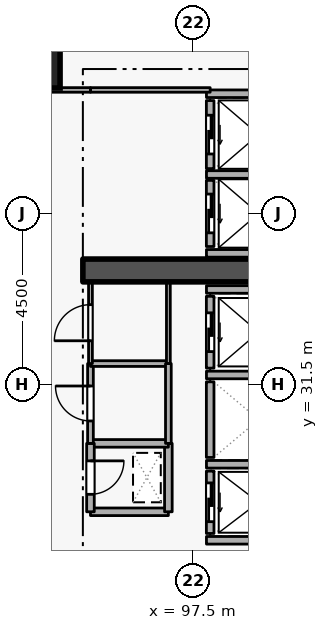
"""IFC4 building model, lengths in metres.
Left out: names, types, materials, properties, quantities, classifications, styles, units other than length and angle.
Written with IfcOpenShell. Run it as: python <this file> out.ifc"""

import sys

from ifc_helpers import new_model, si_unit, direction, frame, frame_2d, origin, origin_2d, place, context, subcontext, project, spatial, rectangle, extrude, element, fill, save


model = new_model("IFC4")
c1 = context("Model", 3, precision=1e-05, world=origin(), true_north=direction((0.0, 1.0)))
c2 = subcontext(c1, "Body", "Model", "MODEL_VIEW")
j1 = project(units=[si_unit("LENGTHUNIT", "METRE"), si_unit("PLANEANGLEUNIT", "RADIAN")], contexts=[c1])
p1 = place(None, origin())
s1 = spatial("IfcSite", under=j1, at=p1, CompositionType="ELEMENT")
p2 = place(p1, origin())
s2 = spatial("IfcBuilding", under=s1, at=p2, CompositionType="ELEMENT")
p3 = place(p2, frame((0.0, 0.0, 64.5)))
s3 = spatial("IfcBuildingStorey", under=s2, at=p3, CompositionType="ELEMENT", Elevation=64.5)
p4 = place(p3, frame((94.6, 34.5, 0.0), z_axis=(0.0, 0.0, 1.0), x_axis=(1.0, 0.0, 0.0)))
e1 = element("IfcWall", 1, at=p4, inside=s3, PredefinedType="SHEAR", context=c2, shape_type="SweptSolid", body=[
    extrude(rectangle(XDim=5.7, YDim=0.6, at=frame_2d((2.85, 0.0))), origin(), (0.0, 0.0, 1.0), 3.6),
])
p5 = place(p3, frame((93.3, 40.0, 0.0), z_axis=(0.0, 0.0, 1.0), x_axis=(1.0, 0.0, 0.0)))
e2 = element("IfcColumn", 2, at=p5, inside=s3, PredefinedType="COLUMN", context=c2, shape_type="SweptSolid", body=[
    extrude(rectangle(XDim=1.4, YDim=1.4, at=origin_2d()), origin(), (0.0, 0.0, 1.0), 3.6),
])
p6 = place(p3, frame((97.95, 29.22, 0.0), z_axis=(0.0, 0.0, 1.0), x_axis=(0.0, -1.0, 0.0)))
e3 = element("IfcWall", 3, at=p6, inside=s3, PredefinedType="STANDARD", context=c2, shape_type="SweptSolid", body=[
    extrude(rectangle(XDim=1.64, YDim=0.2, at=frame_2d((0.82, 0.0))), origin(), (0.0, 0.0, 1.0), 3.34),
])
p7 = place(p6, frame((0.31, 0.0, 0.0)))
e4 = element("IfcOpeningElement", 4, at=p7, cuts=e3, PredefinedType="OPENING", context=c2, shape_type="SweptSolid", body=[
    extrude(rectangle(XDim=1.02, YDim=2.06, at=frame_2d((0.51, 1.03))), frame((0.0, 0.11, 0.0), z_axis=(0.0, -1.0, 0.0), x_axis=(1.0, 0.0, 0.0)), (0.0, 0.0, 1.0), 0.22),
])
p8 = place(p3, frame((97.95, 31.57, 0.0), z_axis=(0.0, 0.0, 1.0), x_axis=(0.0, -1.0, 0.0)))
e5 = element("IfcWall", 5, at=p8, inside=s3, PredefinedType="STANDARD", context=c2, shape_type="SweptSolid", body=[
    extrude(rectangle(XDim=1.99, YDim=0.2, at=frame_2d((0.995, 0.0))), origin(), (0.0, 0.0, 1.0), 3.34),
])
p9 = place(p3, frame((97.95, 33.82, 0.0), z_axis=(0.0, 0.0, 1.0), x_axis=(0.0, -1.0, 0.0)))
e6 = element("IfcWall", 6, at=p9, inside=s3, PredefinedType="STANDARD", context=c2, shape_type="SweptSolid", body=[
    extrude(rectangle(XDim=1.89, YDim=0.2, at=frame_2d((0.945, 0.0))), origin(), (0.0, 0.0, 1.0), 3.34),
])
p10 = place(p9, frame((0.435, 0.0, 0.0)))
e7 = element("IfcOpeningElement", 7, at=p10, cuts=e6, PredefinedType="OPENING", context=c2, shape_type="SweptSolid", body=[
    extrude(rectangle(XDim=1.02, YDim=2.06, at=frame_2d((0.51, 1.03))), frame((0.0, 0.11, 0.0), z_axis=(0.0, -1.0, 0.0), x_axis=(1.0, 0.0, 0.0)), (0.0, 0.0, 1.0), 0.22),
])
p11 = place(p3, frame((97.95, 36.87, 0.0), z_axis=(0.0, 0.0, 1.0), x_axis=(0.0, -1.0, 0.0)))
e8 = element("IfcWall", 8, at=p11, inside=s3, PredefinedType="STANDARD", context=c2, shape_type="SweptSolid", body=[
    extrude(rectangle(XDim=1.74, YDim=0.2, at=frame_2d((0.87, 0.0))), origin(), (0.0, 0.0, 1.0), 3.34),
])
p12 = place(p11, frame((0.36, 0.0, 0.0)))
e9 = element("IfcOpeningElement", 9, at=p12, cuts=e8, PredefinedType="OPENING", context=c2, shape_type="SweptSolid", body=[
    extrude(rectangle(XDim=1.02, YDim=2.06, at=frame_2d((0.51, 1.03))), frame((0.0, 0.11, 0.0), z_axis=(0.0, -1.0, 0.0), x_axis=(1.0, 0.0, 0.0)), (0.0, 0.0, 1.0), 0.22),
])
p13 = place(p3, frame((97.95, 38.97, 0.0), z_axis=(0.0, 0.0, 1.0), x_axis=(0.0, -1.0, 0.0)))
e10 = element("IfcWall", 10, at=p13, inside=s3, PredefinedType="STANDARD", context=c2, shape_type="SweptSolid", body=[
    extrude(rectangle(XDim=1.79, YDim=0.2, at=frame_2d((0.895, 0.0))), origin(), (0.0, 0.0, 1.0), 3.34),
])
p14 = place(p13, frame((0.385, 0.0, 0.0)))
e11 = element("IfcOpeningElement", 11, at=p14, cuts=e10, PredefinedType="OPENING", context=c2, shape_type="SweptSolid", body=[
    extrude(rectangle(XDim=1.02, YDim=2.06, at=frame_2d((0.51, 1.03))), frame((0.0, 0.11, 0.0), z_axis=(0.0, -1.0, 0.0), x_axis=(1.0, 0.0, 0.0)), (0.0, 0.0, 1.0), 0.22),
])
for number, where, z_axis, x_axis in (
    (12, (97.852, 29.4, 0.0), (0.0, 0.0, 1.0), (1.0, 0.0, 0.0)),
    (13, (97.852, 27.4, 0.0), (0.0, 0.0, 1.0), (1.0, 0.0, 0.0)),
    (14, (97.852, 31.75, 0.0), (0.0, 0.0, 1.0), (1.0, 0.0, 0.0)),
    (15, (97.852, 34.0, 0.0), (0.0, 0.0, 1.0), (1.0, 0.0, 0.0)),
):
    element("IfcWall", number, at=place(p3, frame(where, z_axis=z_axis, x_axis=x_axis)), inside=s3, PredefinedType="STANDARD", context=c2, shape_type="SweptSolid", body=[
        extrude(rectangle(XDim=2.436, YDim=0.2, at=frame_2d((1.218, 0.0))), origin(), (0.0, 0.0, 1.0), 3.34),
    ])
for number, where, z_axis, x_axis in (
    (16, (97.852, 37.025, 0.0), (0.0, 0.0, 1.0), (1.0, 0.0, 0.0)),
    (17, (97.852, 34.95, 0.0), (0.0, 0.0, 1.0), (1.0, 0.0, 0.0)),
):
    element("IfcWall", number, at=place(p3, frame(where, z_axis=z_axis, x_axis=x_axis)), inside=s3, PredefinedType="STANDARD", context=c2, shape_type="SweptSolid", body=[
        extrude(rectangle(XDim=2.746, YDim=0.2, at=frame_2d((1.373, 0.0))), origin(), (0.0, 0.0, 1.0), 3.34),
    ])
p15 = place(p3, frame((97.852, 39.15, 0.0), z_axis=(0.0, 0.0, 1.0), x_axis=(1.0, 0.0, 0.0)))
e18 = element("IfcWall", 18, at=p15, inside=s3, PredefinedType="STANDARD", context=c2, shape_type="SweptSolid", body=[
    extrude(rectangle(XDim=2.636, YDim=0.2, at=frame_2d((1.318, 0.0))), origin(), (0.0, 0.0, 1.0), 3.34),
])
p16 = place(p3, frame((94.8, 28.15, 0.0), z_axis=(0.0, 0.0, 1.0), x_axis=(1.0, 0.0, 0.0)))
e19 = element("IfcWall", 19, at=p16, inside=s3, PredefinedType="STANDARD", context=c2, shape_type="SweptSolid", body=[
    extrude(rectangle(XDim=2.05, YDim=0.2, at=frame_2d((1.025, 0.0))), origin(), (0.0, 0.0, 1.0), 3.34),
])
p17 = place(p3, frame((96.85, 28.15, 0.0), z_axis=(0.0, 0.0, 1.0), x_axis=(0.0, 1.0, 0.0)))
e20 = element("IfcWall", 20, at=p17, inside=s3, PredefinedType="STANDARD", context=c2, shape_type="SweptSolid", body=[
    extrude(rectangle(XDim=1.8, YDim=0.2, at=frame_2d((0.9, 0.0))), origin(), (0.0, 0.0, 1.0), 3.34),
])
p18 = place(p3, frame((96.85, 29.95, 0.0), z_axis=(0.0, 0.0, 1.0), x_axis=(-1.0, 0.0, 0.0)))
e21 = element("IfcWall", 21, at=p18, inside=s3, PredefinedType="STANDARD", context=c2, shape_type="SweptSolid", body=[
    extrude(rectangle(XDim=2.05, YDim=0.2, at=frame_2d((1.025, 0.0))), origin(), (0.0, 0.0, 1.0), 3.34),
])
p19 = place(p3, frame((94.8, 29.95, 0.0), z_axis=(0.0, 0.0, 1.0), x_axis=(0.0, -1.0, 0.0)))
e22 = element("IfcWall", 22, at=p19, inside=s3, PredefinedType="STANDARD", context=c2, shape_type="SweptSolid", body=[
    extrude(rectangle(XDim=1.8, YDim=0.2, at=frame_2d((0.9, 0.0))), origin(), (0.0, 0.0, 1.0), 3.34),
])
p20 = place(p19, frame((0.46, 0.0, 0.0)))
e23 = element("IfcOpeningElement", 23, at=p20, cuts=e22, PredefinedType="OPENING", context=c2, shape_type="SweptSolid", body=[
    extrude(rectangle(XDim=0.88, YDim=2.04, at=frame_2d((0.44, 1.02))), frame((0.0, 0.11, 0.0), z_axis=(0.0, -1.0, 0.0), x_axis=(1.0, 0.0, 0.0)), (0.0, 0.0, 1.0), 0.22),
])
p21 = place(p3, frame((94.8, 29.95, 0.0), z_axis=(0.0, 0.0, 1.0), x_axis=(0.0, 1.0, 0.0)))
e24 = element("IfcWall", 24, at=p21, inside=s3, PredefinedType="PARTITIONING", context=c2, shape_type="SweptSolid", body=[
    extrude(rectangle(XDim=2.1, YDim=0.15, at=frame_2d((1.05, 0.0))), origin(), (0.0, 0.0, 1.0), 3.34),
])
p22 = place(p21, frame((0.59, 0.0, 0.0)))
e25 = element("IfcOpeningElement", 25, at=p22, cuts=e24, PredefinedType="OPENING", context=c2, shape_type="SweptSolid", body=[
    extrude(rectangle(XDim=0.92, YDim=2.08, at=frame_2d((0.46, 1.04))), frame((0.0, 0.085, 0.0), z_axis=(0.0, -1.0, 0.0), x_axis=(1.0, 0.0, 0.0)), (0.0, 0.0, 1.0), 0.17),
])
p23 = place(p3, frame((94.8, 32.05, 0.0), z_axis=(0.0, 0.0, 1.0), x_axis=(1.0, 0.0, 0.0)))
e26 = element("IfcWall", 26, at=p23, inside=s3, PredefinedType="PARTITIONING", context=c2, shape_type="SweptSolid", body=[
    extrude(rectangle(XDim=2.05, YDim=0.15, at=frame_2d((1.025, 0.0))), origin(), (0.0, 0.0, 1.0), 3.34),
])
p24 = place(p3, frame((96.85, 32.05, 0.0), z_axis=(0.0, 0.0, 1.0), x_axis=(0.0, -1.0, 0.0)))
e27 = element("IfcWall", 27, at=p24, inside=s3, PredefinedType="PARTITIONING", context=c2, shape_type="SweptSolid", body=[
    extrude(rectangle(XDim=2.1, YDim=0.15, at=frame_2d((1.05, 0.0))), origin(), (0.0, 0.0, 1.0), 3.34),
])
p25 = place(p3, frame((94.8, 32.05, 0.0), z_axis=(0.0, 0.0, 1.0), x_axis=(0.0, 1.0, 0.0)))
e28 = element("IfcWall", 28, at=p25, inside=s3, PredefinedType="PARTITIONING", context=c2, shape_type="SweptSolid", body=[
    extrude(rectangle(XDim=2.15, YDim=0.1, at=frame_2d((1.075, 0.0))), origin(), (0.0, 0.0, 1.0), 3.34),
])
p26 = place(p25, frame((0.6, 0.0, 0.0)))
e29 = element("IfcOpeningElement", 29, at=p26, cuts=e28, PredefinedType="OPENING", context=c2, shape_type="SweptSolid", body=[
    extrude(rectangle(XDim=0.95, YDim=2.1, at=frame_2d((0.475, 1.05))), frame((0.0, 0.06, 0.0), z_axis=(0.0, -1.0, 0.0), x_axis=(1.0, 0.0, 0.0)), (0.0, 0.0, 1.0), 0.12),
])
p27 = place(p3, frame((96.85, 34.2, 0.0), z_axis=(0.0, 0.0, 1.0), x_axis=(0.0, -1.0, 0.0)))
e30 = element("IfcWall", 30, at=p27, inside=s3, PredefinedType="PARTITIONING", context=c2, shape_type="SweptSolid", body=[
    extrude(rectangle(XDim=2.15, YDim=0.1, at=frame_2d((1.075, 0.0))), origin(), (0.0, 0.0, 1.0), 3.34),
])
p28 = place(p3, frame((97.95, 39.25, 0.0), z_axis=(0.0, 0.0, 1.0), x_axis=(-1.0, 0.0, 0.0)))
e31 = element("IfcWall", 31, at=p28, inside=s3, PredefinedType="PARTITIONING", context=c2, shape_type="SweptSolid", body=[
    extrude(rectangle(XDim=3.15, YDim=0.12, at=frame_2d((1.575, 0.0))), origin(), (0.0, 0.0, 1.0), 3.34),
])
p29 = place(p3, frame((94.8, 39.25, 0.0), z_axis=(0.0, 0.0, 1.0), x_axis=(-1.0, 0.0, 0.0)))
e32 = element("IfcWall", 32, at=p29, inside=s3, PredefinedType="PARTITIONING", context=c2, shape_type="SweptSolid", body=[
    extrude(rectangle(XDim=1.85, YDim=0.12, at=frame_2d((0.925, 0.0))), origin(), (0.0, 0.0, 1.0), 3.34),
])
p30 = place(p7, origin())
e33 = element("IfcDoor", 33, at=p30, inside=s3, OperationType="SLIDING_TO_LEFT", PredefinedType="DOOR", context=c2, shape_type="SweptSolid", body=[
    extrude(rectangle(XDim=1.02, YDim=2.06, at=frame_2d((0.51, 1.03))), frame((0.0, 0.025, 0.0), z_axis=(0.0, -1.0, 0.0), x_axis=(1.0, 0.0, 0.0)), (0.0, 0.0, 1.0), 0.05),
])
fill(e4, e33)
p31 = place(p10, origin())
e34 = element("IfcDoor", 34, at=p31, inside=s3, OperationType="SLIDING_TO_LEFT", PredefinedType="DOOR", context=c2, shape_type="SweptSolid", body=[
    extrude(rectangle(XDim=1.02, YDim=2.06, at=frame_2d((0.51, 1.03))), frame((0.0, 0.025, 0.0), z_axis=(0.0, -1.0, 0.0), x_axis=(1.0, 0.0, 0.0)), (0.0, 0.0, 1.0), 0.05),
])
fill(e7, e34)
p32 = place(p12, origin())
e35 = element("IfcDoor", 35, at=p32, inside=s3, OperationType="SLIDING_TO_LEFT", PredefinedType="DOOR", context=c2, shape_type="SweptSolid", body=[
    extrude(rectangle(XDim=1.02, YDim=2.06, at=frame_2d((0.51, 1.03))), frame((0.0, 0.025, 0.0), z_axis=(0.0, -1.0, 0.0), x_axis=(1.0, 0.0, 0.0)), (0.0, 0.0, 1.0), 0.05),
])
fill(e9, e35)
p33 = place(p14, origin())
e36 = element("IfcDoor", 36, at=p33, inside=s3, OperationType="SLIDING_TO_LEFT", PredefinedType="DOOR", context=c2, shape_type="SweptSolid", body=[
    extrude(rectangle(XDim=1.02, YDim=2.06, at=frame_2d((0.51, 1.03))), frame((0.0, 0.025, 0.0), z_axis=(0.0, -1.0, 0.0), x_axis=(1.0, 0.0, 0.0)), (0.0, 0.0, 1.0), 0.05),
])
fill(e11, e36)
p34 = place(p20, origin())
e37 = element("IfcDoor", 37, at=p34, inside=s3, OperationType="SINGLE_SWING_LEFT", PredefinedType="DOOR", context=c2, shape_type="SweptSolid", body=[
    extrude(rectangle(XDim=0.88, YDim=2.04, at=frame_2d((0.44, 1.02))), frame((0.0, 0.025, 0.0), z_axis=(0.0, -1.0, 0.0), x_axis=(1.0, 0.0, 0.0)), (0.0, 0.0, 1.0), 0.05),
])
fill(e23, e37)
p35 = place(p22, origin())
e38 = element("IfcDoor", 38, at=p35, inside=s3, OperationType="SINGLE_SWING_RIGHT", PredefinedType="DOOR", context=c2, shape_type="SweptSolid", body=[
    extrude(rectangle(XDim=0.92, YDim=2.08, at=frame_2d((0.46, 1.04))), frame((0.0, 0.025, 0.0), z_axis=(0.0, -1.0, 0.0), x_axis=(1.0, 0.0, 0.0)), (0.0, 0.0, 1.0), 0.05),
])
fill(e25, e38)
p36 = place(p26, origin())
e39 = element("IfcDoor", 39, at=p36, inside=s3, OperationType="SINGLE_SWING_LEFT", PredefinedType="DOOR", context=c2, shape_type="SweptSolid", body=[
    extrude(rectangle(XDim=0.95, YDim=2.1, at=frame_2d((0.475, 1.05))), frame((0.0, 0.025, 0.0), z_axis=(0.0, -1.0, 0.0), x_axis=(1.0, 0.0, 0.0)), (0.0, 0.0, 1.0), 0.05),
])
fill(e29, e39)
save(model, sys.argv[1])
